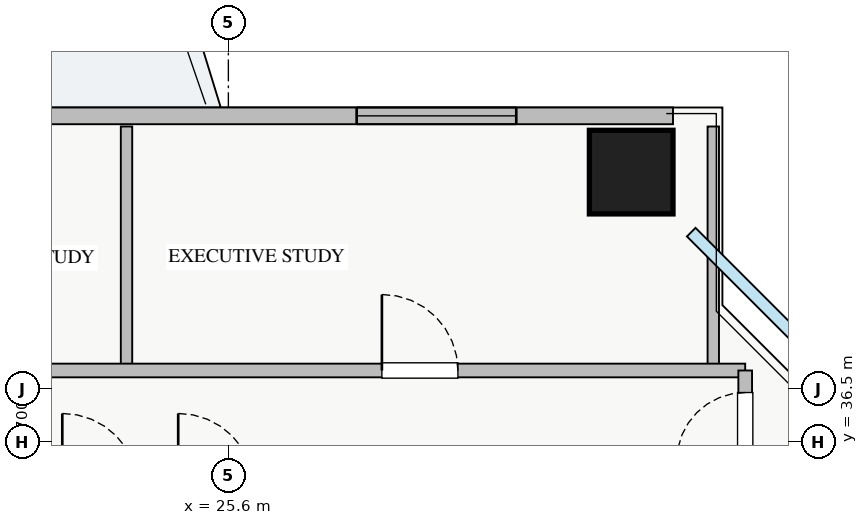
"""IFC4 building model, lengths in metres.
Left out: names, types, materials, properties, quantities, classifications, styles, units other than length and angle.
Written with IfcOpenShell. Run it as: python <this file> out.ifc"""

import sys

from ifc_helpers import new_model, si_unit, direction, frame, frame_2d, origin, origin_2d, place, context, subcontext, project, spatial, rectangle, extrude, source, transform, mapped, element, fill, save


model = new_model("IFC4")
c1 = context("Model", 3, precision=1e-05, world=origin(), true_north=direction((0.0, 1.0)))
c2 = subcontext(c1, "Body", "Model", "MODEL_VIEW")
j1 = project(units=[si_unit("LENGTHUNIT", "METRE"), si_unit("PLANEANGLEUNIT", "RADIAN")], contexts=[c1])
p1 = place(None, origin())
s1 = spatial("IfcSite", under=j1, at=p1, CompositionType="ELEMENT")
p2 = place(p1, origin())
s2 = spatial("IfcBuilding", under=s1, at=p2, CompositionType="ELEMENT")
p3 = place(p2, frame((0.0, 0.0, 132.75)))
s3 = spatial("IfcBuildingStorey", under=s2, at=p3, CompositionType="ELEMENT", Elevation=132.75)
m1 = source(origin(), c2, "Body", "SweptSolid", [
    extrude(rectangle(XDim=1.1, YDim=1.1, at=origin_2d()), origin(), (0.0, 0.0, 1.0), 3.25),
])
p4 = place(p3, frame((30.9, 40.05, 0.0), z_axis=(0.0, 0.0, 1.0), x_axis=(1.0, 0.0, 0.0)))
e1 = element("IfcColumn", 1, at=p4, inside=s3, PredefinedType="COLUMN", context=c2, shape_type="MappedRepresentation", body=[
    mapped(m1, transform((0.0, 0.0, 0.0), x_axis=(1.0, 0.0, 0.0), y_axis=(0.0, 1.0, 0.0), z_axis=(0.0, 0.0, 1.0), scale=1.0)),
])
p5 = place(p3, frame((6.55, 40.79, 0.0), z_axis=(0.0, 0.0, 1.0), x_axis=(1.0, 0.0, 0.0)))
e2 = element("IfcWall", 2, at=p5, inside=s3, PredefinedType="STANDARD", context=c2, shape_type="SweptSolid", body=[
    extrude(rectangle(XDim=24.9, YDim=0.22, at=frame_2d((12.45, 0.0))), origin(), (0.0, 0.0, 1.0), 2.61),
])
p6 = place(p5, frame((13.3, 0.0, 0.0)))
e3 = element("IfcOpeningElement", 3, at=p6, cuts=e2, PredefinedType="OPENING", context=c2, shape_type="SweptSolid", body=[
    extrude(rectangle(XDim=1.2, YDim=2.1, at=frame_2d((0.6, 1.05))), frame((0.0, 0.12, 0.0), z_axis=(0.0, -1.0, 0.0), x_axis=(1.0, 0.0, 0.0)), (0.0, 0.0, 1.0), 0.24),
])
p7 = place(p5, frame((0.393, 0.0, 0.9)))
e4 = element("IfcOpeningElement", 4, at=p7, cuts=e2, PredefinedType="OPENING", context=c2, shape_type="SweptSolid", body=[
    extrude(rectangle(XDim=1.5, YDim=1.5, at=frame_2d((0.75, 0.75))), frame((0.0, 0.12, 0.0), z_axis=(0.0, -1.0, 0.0), x_axis=(1.0, 0.0, 0.0)), (0.0, 0.0, 1.0), 0.24),
])
p8 = place(p5, frame((7.088, 0.0, 0.9)))
e5 = element("IfcOpeningElement", 5, at=p8, cuts=e2, PredefinedType="OPENING", context=c2, shape_type="SweptSolid", body=[
    extrude(rectangle(XDim=1.8, YDim=1.5, at=frame_2d((0.9, 0.75))), frame((0.0, 0.12, 0.0), z_axis=(0.0, -1.0, 0.0), x_axis=(1.0, 0.0, 0.0)), (0.0, 0.0, 1.0), 0.24),
])
p9 = place(p5, frame((14.813, 0.0, 0.9)))
e6 = element("IfcOpeningElement", 6, at=p9, cuts=e2, PredefinedType="OPENING", context=c2, shape_type="SweptSolid", body=[
    extrude(rectangle(XDim=1.5, YDim=1.45, at=frame_2d((0.75, 0.725))), frame((0.0, 0.12, 0.0), z_axis=(0.0, -1.0, 0.0), x_axis=(1.0, 0.0, 0.0)), (0.0, 0.0, 1.0), 0.24),
])
p10 = place(p5, frame((20.738, 0.0, 0.9)))
e7 = element("IfcOpeningElement", 7, at=p10, cuts=e2, PredefinedType="OPENING", context=c2, shape_type="SweptSolid", body=[
    extrude(rectangle(XDim=2.1, YDim=1.48, at=frame_2d((1.05, 0.74))), frame((0.0, 0.12, 0.0), z_axis=(0.0, -1.0, 0.0), x_axis=(1.0, 0.0, 0.0)), (0.0, 0.0, 1.0), 0.24),
])
p11 = place(p5, frame((4.171, 0.0, 0.9)))
e8 = element("IfcOpeningElement", 8, at=p11, cuts=e2, PredefinedType="OPENING", context=c2, shape_type="SweptSolid", body=[
    extrude(rectangle(XDim=2.4, YDim=1.5, at=frame_2d((1.2, 0.75))), frame((0.0, 0.12, 0.0), z_axis=(0.0, -1.0, 0.0), x_axis=(1.0, 0.0, 0.0)), (0.0, 0.0, 1.0), 0.24),
])
p12 = place(p5, frame((10.177, 0.0, 0.9)))
e9 = element("IfcOpeningElement", 9, at=p12, cuts=e2, PredefinedType="OPENING", context=c2, shape_type="SweptSolid", body=[
    extrude(rectangle(XDim=2.4, YDim=1.5, at=frame_2d((1.2, 0.75))), frame((0.0, 0.12, 0.0), z_axis=(0.0, -1.0, 0.0), x_axis=(1.0, 0.0, 0.0)), (0.0, 0.0, 1.0), 0.24),
])
for number, where, z_axis, x_axis in (
    (10, (24.26, 37.44, 0.0), (0.0, 0.0, 1.0), (0.0, 1.0, 0.0)),
    (11, (31.98, 37.44, 0.0), (0.0, 0.0, 1.0), (0.0, 1.0, 0.0)),
):
    element("IfcWall", number, at=place(p3, frame(where, z_axis=z_axis, x_axis=x_axis)), inside=s3, PredefinedType="PARTITIONING", context=c2, shape_type="SweptSolid", body=[
        extrude(rectangle(XDim=3.21, YDim=0.15, at=frame_2d((1.605, 0.0))), origin(), (0.0, 0.0, 1.0), 3.07),
    ])
p13 = place(p3, frame((8.82, 37.44, 0.0), z_axis=(0.0, 0.0, 1.0), x_axis=(1.0, 0.0, 0.0)))
e12 = element("IfcWall", 12, at=p13, inside=s3, PredefinedType="PARTITIONING", context=c2, shape_type="SweptSolid", body=[
    extrude(rectangle(XDim=23.58, YDim=0.18, at=frame_2d((11.79, 0.0))), origin(), (0.0, 0.0, 1.0), 3.07),
])
p14 = place(p13, frame((3.085, 0.0, 0.0)))
e13 = element("IfcOpeningElement", 13, at=p14, cuts=e12, PredefinedType="OPENING", context=c2, shape_type="SweptSolid", body=[
    extrude(rectangle(XDim=1.0, YDim=2.05, at=frame_2d((0.5, 1.025))), frame((0.0, 0.1, 0.0), z_axis=(0.0, -1.0, 0.0), x_axis=(1.0, 0.0, 0.0)), (0.0, 0.0, 1.0), 0.2),
])
p15 = place(p13, frame((10.805, 0.0, 0.0)))
e14 = element("IfcOpeningElement", 14, at=p15, cuts=e12, PredefinedType="OPENING", context=c2, shape_type="SweptSolid", body=[
    extrude(rectangle(XDim=1.0, YDim=2.05, at=frame_2d((0.5, 1.025))), frame((0.0, 0.1, 0.0), z_axis=(0.0, -1.0, 0.0), x_axis=(1.0, 0.0, 0.0)), (0.0, 0.0, 1.0), 0.2),
])
p16 = place(p13, frame((18.8, 0.0, 0.0)))
e15 = element("IfcOpeningElement", 15, at=p16, cuts=e12, PredefinedType="OPENING", context=c2, shape_type="SweptSolid", body=[
    extrude(rectangle(XDim=1.0, YDim=2.05, at=frame_2d((0.5, 1.025))), frame((0.0, 0.1, 0.0), z_axis=(0.0, -1.0, 0.0), x_axis=(1.0, 0.0, 0.0)), (0.0, 0.0, 1.0), 0.2),
])
p17 = place(p3, frame((32.4, 8.31, 0.0), z_axis=(0.0, 0.0, 1.0), x_axis=(0.0, 1.0, 0.0)))
e16 = element("IfcWall", 16, at=p17, inside=s3, PredefinedType="PARTITIONING", context=c2, shape_type="SweptSolid", body=[
    extrude(rectangle(XDim=29.13, YDim=0.18, at=frame_2d((14.565, 0.0))), origin(), (0.0, 0.0, 1.0), 3.07),
])
p18 = place(p17, frame((27.94, 0.0, 0.0)))
e17 = element("IfcOpeningElement", 17, at=p18, cuts=e16, PredefinedType="OPENING", context=c2, shape_type="SweptSolid", body=[
    extrude(rectangle(XDim=0.9, YDim=2.05, at=frame_2d((0.45, 1.025))), frame((0.0, 0.1, 0.0), z_axis=(0.0, -1.0, 0.0), x_axis=(1.0, 0.0, 0.0)), (0.0, 0.0, 1.0), 0.2),
])
p19 = place(p17, frame((0.415, 0.0, 0.0)))
e18 = element("IfcOpeningElement", 18, at=p19, cuts=e16, PredefinedType="OPENING", context=c2, shape_type="SweptSolid", body=[
    extrude(rectangle(XDim=0.9, YDim=2.05, at=frame_2d((0.45, 1.025))), frame((0.0, 0.1, 0.0), z_axis=(0.0, -1.0, 0.0), x_axis=(1.0, 0.0, 0.0)), (0.0, 0.0, 1.0), 0.2),
])
p20 = place(p17, frame((4.75, 0.0, 0.0)))
e19 = element("IfcOpeningElement", 19, at=p20, cuts=e16, PredefinedType="OPENING", context=c2, shape_type="SweptSolid", body=[
    extrude(rectangle(XDim=1.0, YDim=2.05, at=frame_2d((0.5, 1.025))), frame((0.0, 0.1, 0.0), z_axis=(0.0, -1.0, 0.0), x_axis=(1.0, 0.0, 0.0)), (0.0, 0.0, 1.0), 0.2),
])
p21 = place(p17, frame((18.11, 0.0, 0.0)))
e20 = element("IfcOpeningElement", 20, at=p21, cuts=e16, PredefinedType="OPENING", context=c2, shape_type="SweptSolid", body=[
    extrude(rectangle(XDim=1.0, YDim=2.05, at=frame_2d((0.5, 1.025))), frame((0.0, 0.1, 0.0), z_axis=(0.0, -1.0, 0.0), x_axis=(1.0, 0.0, 0.0)), (0.0, 0.0, 1.0), 0.2),
])
m2 = source(origin(), c2, "Body", "SweptSolid", [
    extrude(rectangle(XDim=2.1, YDim=1.48, at=frame_2d((1.05, 0.74))), frame((0.0, 0.03, 0.0), z_axis=(0.0, -1.0, 0.0), x_axis=(1.0, 0.0, 0.0)), (0.0, 0.0, 1.0), 0.06),
])
p22 = place(p10, origin())
e21 = element("IfcWindow", 21, at=p22, inside=s3, PartitioningType="TRIPLE_PANEL_VERTICAL", PredefinedType="WINDOW", context=c2, shape_type="MappedRepresentation", body=[
    mapped(m2, transform((0.0, 0.0, 0.0), x_axis=(1.0, 0.0, 0.0), y_axis=(0.0, 1.0, 0.0), z_axis=(0.0, 0.0, 1.0), scale=1.0)),
])
fill(e7, e21)
m3 = source(origin(), c2, "Body", "SweptSolid", [
    extrude(rectangle(XDim=1.0, YDim=2.05, at=frame_2d((0.5, 1.025))), frame((0.0, 0.025, 0.0), z_axis=(0.0, -1.0, 0.0), x_axis=(1.0, 0.0, 0.0)), (0.0, 0.0, 1.0), 0.05),
])
p23 = place(p16, origin())
e22 = element("IfcDoor", 22, at=p23, inside=s3, OperationType="SINGLE_SWING_LEFT", PredefinedType="DOOR", context=c2, shape_type="MappedRepresentation", body=[
    mapped(m3, transform((0.0, 0.0, 0.0), x_axis=(1.0, 0.0, 0.0), y_axis=(0.0, 1.0, 0.0), z_axis=(0.0, 0.0, 1.0), scale=1.0)),
])
fill(e15, e22)
m4 = source(origin(), c2, "Body", "SweptSolid", [
    extrude(rectangle(XDim=0.9, YDim=2.05, at=frame_2d((0.45, 1.025))), frame((0.0, 0.025, 0.0), z_axis=(0.0, -1.0, 0.0), x_axis=(1.0, 0.0, 0.0)), (0.0, 0.0, 1.0), 0.05),
])
p24 = place(p18, origin())
e23 = element("IfcDoor", 23, at=p24, inside=s3, OperationType="SINGLE_SWING_LEFT", PredefinedType="DOOR", context=c2, shape_type="MappedRepresentation", body=[
    mapped(m4, transform((0.0, 0.0, 0.0), x_axis=(1.0, 0.0, 0.0), y_axis=(0.0, 1.0, 0.0), z_axis=(0.0, 0.0, 1.0), scale=1.0)),
])
fill(e17, e23)
save(model, sys.argv[1])
